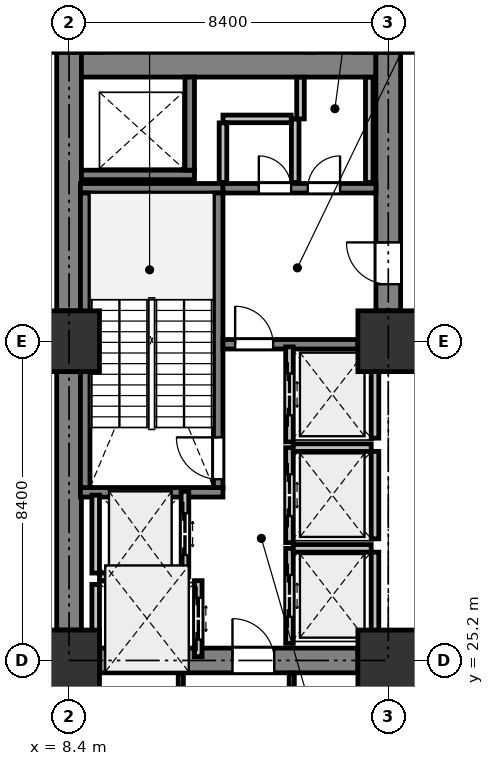
"""IFC4 building model, lengths in metres.
Left out: names, types, materials, properties, quantities, classifications, styles, units other than length and angle.
Written with IfcOpenShell. Run it as: python <this file> out.ifc"""

import sys

from ifc_helpers import new_model, si_unit, direction, frame, frame_2d, origin, origin_2d, place, context, subcontext, project, spatial, rectangle, extrude, element, fill, save


model = new_model("IFC4")
c1 = context("Model", 3, precision=1e-05, world=origin(), true_north=direction((0.0, 1.0)))
c2 = subcontext(c1, "Body", "Model", "MODEL_VIEW")
j1 = project(units=[si_unit("LENGTHUNIT", "METRE"), si_unit("PLANEANGLEUNIT", "RADIAN")], contexts=[c1])
p1 = place(None, origin())
s1 = spatial("IfcSite", under=j1, at=p1, CompositionType="ELEMENT")
p2 = place(p1, origin())
s2 = spatial("IfcBuilding", under=s1, at=p2, CompositionType="ELEMENT")
p3 = place(p2, frame((0.0, 0.0, 10.2)))
s3 = spatial("IfcBuildingStorey", under=s2, at=p3, CompositionType="ELEMENT", Elevation=10.2)
for number, where, z_axis, x_axis in (
    (1, (8.4, 25.2, 0.0), (0.0, 0.0, 1.0), (1.0, 0.0, 0.0)),
    (2, (8.4, 33.6, 0.0), (0.0, 0.0, 1.0), (1.0, 0.0, 0.0)),
    (3, (16.8, 25.2, 0.0), (0.0, 0.0, 1.0), (1.0, 0.0, 0.0)),
    (4, (16.8, 33.6, 0.0), (0.0, 0.0, 1.0), (1.0, 0.0, 0.0)),
):
    element("IfcColumn", number, at=place(p3, frame(where, z_axis=z_axis, x_axis=x_axis)), inside=s3, PredefinedType="COLUMN", context=c2, shape_type="SweptSolid", body=[
        extrude(rectangle(XDim=1.6, YDim=1.6, at=origin_2d()), origin(), (0.0, 0.0, 1.0), 4.8),
    ])
for number, where, z_axis, x_axis in (
    (5, (8.4, 26.0, 0.0), (0.0, 0.0, 1.0), (0.0, 1.0, 0.0)),
    (6, (8.4, 34.4, 0.0), (0.0, 0.0, 1.0), (0.0, 1.0, 0.0)),
):
    element("IfcWall", number, at=place(p3, frame(where, z_axis=z_axis, x_axis=x_axis)), inside=s3, PredefinedType="SHEAR", context=c2, shape_type="SweptSolid", body=[
        extrude(rectangle(XDim=6.8, YDim=0.65, at=frame_2d((3.4, 0.0))), origin(), (0.0, 0.0, 1.0), 4.525),
    ])
p4 = place(p3, frame((8.725, 40.875, 0.0), z_axis=(0.0, 0.0, 1.0), x_axis=(1.0, 0.0, 0.0)))
e7 = element("IfcWall", 7, at=p4, inside=s3, PredefinedType="SHEAR", context=c2, shape_type="SweptSolid", body=[
    extrude(rectangle(XDim=7.75, YDim=0.65, at=frame_2d((3.875, 0.0))), origin(), (0.0, 0.0, 1.0), 4.525),
])
p5 = place(p3, frame((16.8, 34.4, 0.0), z_axis=(0.0, 0.0, 1.0), x_axis=(0.0, 1.0, 0.0)))
e8 = element("IfcWall", 8, at=p5, inside=s3, PredefinedType="SHEAR", context=c2, shape_type="SweptSolid", body=[
    extrude(rectangle(XDim=6.8, YDim=0.65, at=frame_2d((3.4, 0.0))), origin(), (0.0, 0.0, 1.0), 4.525),
])
p6 = place(p5, frame((0.7, 0.0, 0.0)))
e9 = element("IfcOpeningElement", 9, at=p6, cuts=e8, PredefinedType="OPENING", context=c2, shape_type="SweptSolid", body=[
    extrude(rectangle(XDim=1.1, YDim=2.15, at=frame_2d((0.55, 1.075))), frame((0.0, 0.335, 0.0), z_axis=(0.0, -1.0, 0.0), x_axis=(1.0, 0.0, 0.0)), (0.0, 0.0, 1.0), 0.67),
])
p7 = place(p3, frame((9.2, 25.2, 0.0), z_axis=(0.0, 0.0, 1.0), x_axis=(1.0, 0.0, 0.0)))
e10 = element("IfcWall", 10, at=p7, inside=s3, PredefinedType="SHEAR", context=c2, shape_type="SweptSolid", body=[
    extrude(rectangle(XDim=6.8, YDim=0.65, at=frame_2d((3.4, 0.0))), origin(), (0.0, 0.0, 1.0), 4.525),
])
p8 = place(p7, frame((3.5, 0.0, 0.0)))
e11 = element("IfcOpeningElement", 11, at=p8, cuts=e10, PredefinedType="OPENING", context=c2, shape_type="SweptSolid", body=[
    extrude(rectangle(XDim=1.1, YDim=2.15, at=frame_2d((0.55, 1.075))), frame((0.0, 0.335, 0.0), z_axis=(0.0, -1.0, 0.0), x_axis=(1.0, 0.0, 0.0)), (0.0, 0.0, 1.0), 0.67),
])
for number, where, z_axis, x_axis in (
    (12, (12.45, 29.625, 0.0), (0.0, 0.0, 1.0), (-1.0, 0.0, 0.0)),
    (13, (12.45, 37.625, 0.0), (0.0, 0.0, 1.0), (-1.0, 0.0, 0.0)),
):
    element("IfcWall", number, at=place(p3, frame(where, z_axis=z_axis, x_axis=x_axis)), inside=s3, PredefinedType="SHEAR", context=c2, shape_type="SweptSolid", body=[
        extrude(rectangle(XDim=3.75, YDim=0.25, at=frame_2d((1.875, 0.0))), origin(), (0.0, 0.0, 1.0), 4.525),
    ])
p9 = place(p3, frame((12.325, 29.75, 0.0), z_axis=(0.0, 0.0, 1.0), x_axis=(0.0, 1.0, 0.0)))
e14 = element("IfcWall", 14, at=p9, inside=s3, PredefinedType="SHEAR", context=c2, shape_type="SweptSolid", body=[
    extrude(rectangle(XDim=7.75, YDim=0.25, at=frame_2d((3.875, 0.0))), origin(), (0.0, 0.0, 1.0), 4.525),
])
p10 = place(p9, frame((0.22, 0.0, 0.0)))
e15 = element("IfcOpeningElement", 15, at=p10, cuts=e14, PredefinedType="OPENING", context=c2, shape_type="SweptSolid", body=[
    extrude(rectangle(XDim=1.1, YDim=2.15, at=frame_2d((0.55, 1.075))), frame((0.0, 0.135, 0.0), z_axis=(0.0, -1.0, 0.0), x_axis=(1.0, 0.0, 0.0)), (0.0, 0.0, 1.0), 0.27),
])
p11 = place(p3, frame((8.825, 29.75, 0.0), z_axis=(0.0, 0.0, 1.0), x_axis=(0.0, 1.0, 0.0)))
e16 = element("IfcWall", 16, at=p11, inside=s3, PredefinedType="SHEAR", context=c2, shape_type="SweptSolid", body=[
    extrude(rectangle(XDim=7.75, YDim=0.25, at=frame_2d((3.875, 0.0))), origin(), (0.0, 0.0, 1.0), 4.525),
])
p12 = place(p3, frame((8.725, 37.975, 0.0), z_axis=(0.0, 0.0, 1.0), x_axis=(1.0, 0.0, 0.0)))
e17 = element("IfcWall", 17, at=p12, inside=s3, PredefinedType="SHEAR", context=c2, shape_type="SweptSolid", body=[
    extrude(rectangle(XDim=2.975, YDim=0.25, at=frame_2d((1.487, 0.0))), origin(), (0.0, 0.0, 1.0), 4.525),
])
p13 = place(p3, frame((11.575, 38.1, 0.0), z_axis=(0.0, 0.0, 1.0), x_axis=(0.0, 1.0, 0.0)))
e18 = element("IfcWall", 18, at=p13, inside=s3, PredefinedType="SHEAR", context=c2, shape_type="SweptSolid", body=[
    extrude(rectangle(XDim=2.45, YDim=0.25, at=frame_2d((1.225, 0.0))), origin(), (0.0, 0.0, 1.0), 4.525),
])
p14 = place(p3, frame((12.45, 33.52, 0.0), z_axis=(0.0, 0.0, 1.0), x_axis=(1.0, 0.0, 0.0)))
e19 = element("IfcWall", 19, at=p14, inside=s3, PredefinedType="SHEAR", context=c2, shape_type="SweptSolid", body=[
    extrude(rectangle(XDim=3.55, YDim=0.25, at=frame_2d((1.775, 0.0))), origin(), (0.0, 0.0, 1.0), 4.525),
])
p15 = place(p14, frame((0.32, 0.0, 0.0)))
e20 = element("IfcOpeningElement", 20, at=p15, cuts=e19, PredefinedType="OPENING", context=c2, shape_type="SweptSolid", body=[
    extrude(rectangle(XDim=1.0, YDim=2.15, at=frame_2d((0.5, 1.075))), frame((0.0, 0.135, 0.0), z_axis=(0.0, -1.0, 0.0), x_axis=(1.0, 0.0, 0.0)), (0.0, 0.0, 1.0), 0.27),
])
p16 = place(p3, frame((12.45, 37.625, 0.0), z_axis=(0.0, 0.0, 1.0), x_axis=(1.0, 0.0, 0.0)))
e21 = element("IfcWall", 21, at=p16, inside=s3, PredefinedType="SHEAR", context=c2, shape_type="SweptSolid", body=[
    extrude(rectangle(XDim=4.025, YDim=0.25, at=frame_2d((2.013, 0.0))), origin(), (0.0, 0.0, 1.0), 4.525),
])
p17 = place(p16, frame((0.944, 0.0, 0.0)))
e22 = element("IfcOpeningElement", 22, at=p17, cuts=e21, PredefinedType="OPENING", context=c2, shape_type="SweptSolid", body=[
    extrude(rectangle(XDim=0.85, YDim=2.15, at=frame_2d((0.425, 1.075))), frame((0.0, 0.135, 0.0), z_axis=(0.0, -1.0, 0.0), x_axis=(1.0, 0.0, 0.0)), (0.0, 0.0, 1.0), 0.27),
])
p18 = place(p16, frame((2.231, 0.0, 0.0)))
e23 = element("IfcOpeningElement", 23, at=p18, cuts=e21, PredefinedType="OPENING", context=c2, shape_type="SweptSolid", body=[
    extrude(rectangle(XDim=0.85, YDim=2.15, at=frame_2d((0.425, 1.075))), frame((0.0, 0.135, 0.0), z_axis=(0.0, -1.0, 0.0), x_axis=(1.0, 0.0, 0.0)), (0.0, 0.0, 1.0), 0.27),
])
p19 = place(p3, frame((11.45, 27.4, 0.0), z_axis=(0.0, 0.0, 1.0), x_axis=(0.0, 1.0, 0.0)))
e24 = element("IfcWall", 24, at=p19, inside=s3, PredefinedType="PARTITIONING", context=c2, shape_type="SweptSolid", body=[
    extrude(rectangle(XDim=2.25, YDim=0.2, at=frame_2d((1.125, 0.0))), origin(), (0.0, 0.0, 1.0), 4.525),
])
p20 = place(p19, frame((0.575, 0.0, 0.0)))
e25 = element("IfcOpeningElement", 25, at=p20, cuts=e24, PredefinedType="OPENING", context=c2, shape_type="SweptSolid", body=[
    extrude(rectangle(XDim=1.1, YDim=2.2, at=frame_2d((0.55, 1.1))), frame((0.0, 0.11, 0.0), z_axis=(0.0, -1.0, 0.0), x_axis=(1.0, 0.0, 0.0)), (0.0, 0.0, 1.0), 0.22),
])
p21 = place(p3, frame((9.1, 27.5, 0.0), z_axis=(0.0, 0.0, 1.0), x_axis=(0.0, 1.0, 0.0)))
e26 = element("IfcWall", 26, at=p21, inside=s3, PredefinedType="PARTITIONING", context=c2, shape_type="SweptSolid", body=[
    extrude(rectangle(XDim=2.05, YDim=0.2, at=frame_2d((1.025, 0.0))), origin(), (0.0, 0.0, 1.0), 4.525),
])
p22 = place(p3, frame((9.2, 27.4, 0.0), z_axis=(0.0, 0.0, 1.0), x_axis=(1.0, 0.0, 0.0)))
e27 = element("IfcWall", 27, at=p22, inside=s3, PredefinedType="PARTITIONING", context=c2, shape_type="SweptSolid", body=[
    extrude(rectangle(XDim=2.15, YDim=0.2, at=frame_2d((1.075, 0.0))), origin(), (0.0, 0.0, 1.0), 4.525),
])
p23 = place(p3, frame((11.8, 25.3, 0.0), z_axis=(0.0, 0.0, 1.0), x_axis=(0.0, 1.0, 0.0)))
e28 = element("IfcWall", 28, at=p23, inside=s3, PredefinedType="PARTITIONING", context=c2, shape_type="SweptSolid", body=[
    extrude(rectangle(XDim=2.0, YDim=0.2, at=frame_2d((1.0, 0.0))), origin(), (0.0, 0.0, 1.0), 4.525),
])
p24 = place(p23, frame((0.45, 0.0, 0.0)))
e29 = element("IfcOpeningElement", 29, at=p24, cuts=e28, PredefinedType="OPENING", context=c2, shape_type="SweptSolid", body=[
    extrude(rectangle(XDim=1.1, YDim=2.2, at=frame_2d((0.55, 1.1))), frame((0.0, 0.11, 0.0), z_axis=(0.0, -1.0, 0.0), x_axis=(1.0, 0.0, 0.0)), (0.0, 0.0, 1.0), 0.22),
])
p25 = place(p3, frame((9.1, 25.4, 0.0), z_axis=(0.0, 0.0, 1.0), x_axis=(0.0, 1.0, 0.0)))
e30 = element("IfcWall", 30, at=p25, inside=s3, PredefinedType="PARTITIONING", context=c2, shape_type="SweptSolid", body=[
    extrude(rectangle(XDim=1.8, YDim=0.2, at=frame_2d((0.9, 0.0))), origin(), (0.0, 0.0, 1.0), 4.525),
])
p26 = place(p3, frame((14.2, 25.65, 0.0), z_axis=(0.0, 0.0, 1.0), x_axis=(0.0, 1.0, 0.0)))
e31 = element("IfcWall", 31, at=p26, inside=s3, PredefinedType="PARTITIONING", context=c2, shape_type="SweptSolid", body=[
    extrude(rectangle(XDim=2.5, YDim=0.2, at=frame_2d((1.25, 0.0))), origin(), (0.0, 0.0, 1.0), 4.525),
])
p27 = place(p26, frame((0.7, 0.0, 0.0)))
e32 = element("IfcOpeningElement", 32, at=p27, cuts=e31, PredefinedType="OPENING", context=c2, shape_type="SweptSolid", body=[
    extrude(rectangle(XDim=1.1, YDim=2.2, at=frame_2d((0.55, 1.1))), frame((0.0, 0.11, 0.0), z_axis=(0.0, -1.0, 0.0), x_axis=(1.0, 0.0, 0.0)), (0.0, 0.0, 1.0), 0.22),
])
p28 = place(p3, frame((16.45, 25.75, 0.0), z_axis=(0.0, 0.0, 1.0), x_axis=(0.0, 1.0, 0.0)))
e33 = element("IfcWall", 33, at=p28, inside=s3, PredefinedType="PARTITIONING", context=c2, shape_type="SweptSolid", body=[
    extrude(rectangle(XDim=2.3, YDim=0.2, at=frame_2d((1.15, 0.0))), origin(), (0.0, 0.0, 1.0), 4.525),
])
p29 = place(p3, frame((14.3, 28.15, 0.0), z_axis=(0.0, 0.0, 1.0), x_axis=(1.0, 0.0, 0.0)))
e34 = element("IfcWall", 34, at=p29, inside=s3, PredefinedType="PARTITIONING", context=c2, shape_type="SweptSolid", body=[
    extrude(rectangle(XDim=2.05, YDim=0.2, at=frame_2d((1.025, 0.0))), origin(), (0.0, 0.0, 1.0), 4.525),
])
p30 = place(p3, frame((14.2, 28.3, 0.0), z_axis=(0.0, 0.0, 1.0), x_axis=(0.0, 1.0, 0.0)))
e35 = element("IfcWall", 35, at=p30, inside=s3, PredefinedType="PARTITIONING", context=c2, shape_type="SweptSolid", body=[
    extrude(rectangle(XDim=2.5, YDim=0.2, at=frame_2d((1.25, 0.0))), origin(), (0.0, 0.0, 1.0), 4.525),
])
p31 = place(p30, frame((0.7, 0.0, 0.0)))
e36 = element("IfcOpeningElement", 36, at=p31, cuts=e35, PredefinedType="OPENING", context=c2, shape_type="SweptSolid", body=[
    extrude(rectangle(XDim=1.1, YDim=2.2, at=frame_2d((0.55, 1.1))), frame((0.0, 0.11, 0.0), z_axis=(0.0, -1.0, 0.0), x_axis=(1.0, 0.0, 0.0)), (0.0, 0.0, 1.0), 0.22),
])
p32 = place(p3, frame((16.45, 28.4, 0.0), z_axis=(0.0, 0.0, 1.0), x_axis=(0.0, 1.0, 0.0)))
e37 = element("IfcWall", 37, at=p32, inside=s3, PredefinedType="PARTITIONING", context=c2, shape_type="SweptSolid", body=[
    extrude(rectangle(XDim=2.3, YDim=0.2, at=frame_2d((1.15, 0.0))), origin(), (0.0, 0.0, 1.0), 4.525),
])
p33 = place(p3, frame((14.3, 30.8, 0.0), z_axis=(0.0, 0.0, 1.0), x_axis=(1.0, 0.0, 0.0)))
e38 = element("IfcWall", 38, at=p33, inside=s3, PredefinedType="PARTITIONING", context=c2, shape_type="SweptSolid", body=[
    extrude(rectangle(XDim=2.05, YDim=0.2, at=frame_2d((1.025, 0.0))), origin(), (0.0, 0.0, 1.0), 4.525),
])
p34 = place(p3, frame((14.2, 30.95, 0.0), z_axis=(0.0, 0.0, 1.0), x_axis=(0.0, 1.0, 0.0)))
e39 = element("IfcWall", 39, at=p34, inside=s3, PredefinedType="PARTITIONING", context=c2, shape_type="SweptSolid", body=[
    extrude(rectangle(XDim=2.5, YDim=0.2, at=frame_2d((1.25, 0.0))), origin(), (0.0, 0.0, 1.0), 4.525),
])
p35 = place(p34, frame((0.7, 0.0, 0.0)))
e40 = element("IfcOpeningElement", 40, at=p35, cuts=e39, PredefinedType="OPENING", context=c2, shape_type="SweptSolid", body=[
    extrude(rectangle(XDim=1.1, YDim=2.2, at=frame_2d((0.55, 1.1))), frame((0.0, 0.11, 0.0), z_axis=(0.0, -1.0, 0.0), x_axis=(1.0, 0.0, 0.0)), (0.0, 0.0, 1.0), 0.22),
])
p36 = place(p3, frame((16.45, 31.05, 0.0), z_axis=(0.0, 0.0, 1.0), x_axis=(0.0, 1.0, 0.0)))
e41 = element("IfcWall", 41, at=p36, inside=s3, PredefinedType="PARTITIONING", context=c2, shape_type="SweptSolid", body=[
    extrude(rectangle(XDim=2.3, YDim=0.2, at=frame_2d((1.15, 0.0))), origin(), (0.0, 0.0, 1.0), 4.525),
])
p37 = place(p3, frame((14.35, 37.78, 0.0), z_axis=(0.0, 0.0, 1.0), x_axis=(0.0, 1.0, 0.0)))
e42 = element("IfcWall", 42, at=p37, inside=s3, PredefinedType="PARTITIONING", context=c2, shape_type="SweptSolid", body=[
    extrude(rectangle(XDim=1.67, YDim=0.2, at=frame_2d((0.835, 0.0))), origin(), (0.0, 0.0, 1.0), 3.425),
])
p38 = place(p3, frame((14.246, 39.45, 0.0), z_axis=(0.0, 0.0, 1.0), x_axis=(-1.0, 0.0, 0.0)))
e43 = element("IfcWall", 43, at=p38, inside=s3, PredefinedType="PARTITIONING", context=c2, shape_type="SweptSolid", body=[
    extrude(rectangle(XDim=1.796, YDim=0.2, at=frame_2d((0.898, 0.0))), origin(), (0.0, 0.0, 1.0), 3.425),
])
p39 = place(p3, frame((12.45, 39.346, 0.0), z_axis=(0.0, 0.0, 1.0), x_axis=(0.0, -1.0, 0.0)))
e44 = element("IfcWall", 44, at=p39, inside=s3, PredefinedType="PARTITIONING", context=c2, shape_type="SweptSolid", body=[
    extrude(rectangle(XDim=1.566, YDim=0.2, at=frame_2d((0.783, 0.0))), origin(), (0.0, 0.0, 1.0), 3.425),
])
p40 = place(p3, frame((16.3, 37.78, 0.0), z_axis=(0.0, 0.0, 1.0), x_axis=(0.0, 1.0, 0.0)))
e45 = element("IfcWall", 45, at=p40, inside=s3, PredefinedType="PARTITIONING", context=c2, shape_type="SweptSolid", body=[
    extrude(rectangle(XDim=2.766, YDim=0.2, at=frame_2d((1.383, 0.0))), origin(), (0.0, 0.0, 1.0), 3.425),
])
p41 = place(p3, frame((14.49, 40.546, 0.0), z_axis=(0.0, 0.0, 1.0), x_axis=(0.0, -1.0, 0.0)))
e46 = element("IfcWall", 46, at=p41, inside=s3, PredefinedType="PARTITIONING", context=c2, shape_type="SweptSolid", body=[
    extrude(rectangle(XDim=1.096, YDim=0.2, at=frame_2d((0.548, 0.0))), origin(), (0.0, 0.0, 1.0), 3.425),
])
p42 = place(p3, frame((14.26, 24.871, 0.0), z_axis=(0.0, 0.0, 1.0), x_axis=(0.0, -1.0, 0.0)))
e47 = element("IfcWall", 47, at=p42, inside=s3, PredefinedType="PARTITIONING", context=c2, shape_type="SweptSolid", body=[
    extrude(rectangle(XDim=4.711, YDim=0.135, at=frame_2d((2.355, 0.0))), origin(), (0.0, 0.0, 1.0), 4.525),
])
p43 = place(p42, frame((1.881, 0.0, 0.0)))
e48 = element("IfcOpeningElement", 48, at=p43, cuts=e47, PredefinedType="OPENING", context=c2, shape_type="SweptSolid", body=[
    extrude(rectangle(XDim=0.95, YDim=2.15, at=frame_2d((0.475, 1.075))), frame((0.0, 0.077, 0.0), z_axis=(0.0, -1.0, 0.0), x_axis=(1.0, 0.0, 0.0)), (0.0, 0.0, 1.0), 0.155),
])
p44 = place(p3, frame((11.34, 20.231, 0.0), z_axis=(0.0, 0.0, 1.0), x_axis=(0.0, 1.0, 0.0)))
e49 = element("IfcWall", 49, at=p44, inside=s3, PredefinedType="PARTITIONING", context=c2, shape_type="SweptSolid", body=[
    extrude(rectangle(XDim=4.64, YDim=0.135, at=frame_2d((2.32, 0.0))), origin(), (0.0, 0.0, 1.0), 4.525),
])
p45 = place(p44, frame((1.845, 0.0, 0.0)))
e50 = element("IfcOpeningElement", 50, at=p45, cuts=e49, PredefinedType="OPENING", context=c2, shape_type="SweptSolid", body=[
    extrude(rectangle(XDim=0.95, YDim=2.15, at=frame_2d((0.475, 1.075))), frame((0.0, 0.077, 0.0), z_axis=(0.0, -1.0, 0.0), x_axis=(1.0, 0.0, 0.0)), (0.0, 0.0, 1.0), 0.155),
])
p46 = place(p6, origin())
e51 = element("IfcDoor", 51, at=p46, inside=s3, OperationType="SINGLE_SWING_RIGHT", PredefinedType="DOOR", context=c2, shape_type="SweptSolid", body=[
    extrude(rectangle(XDim=1.1, YDim=2.15, at=frame_2d((0.55, 1.075))), frame((0.0, 0.025, 0.0), z_axis=(0.0, -1.0, 0.0), x_axis=(1.0, 0.0, 0.0)), (0.0, 0.0, 1.0), 0.05),
])
fill(e9, e51)
p47 = place(p8, origin())
e52 = element("IfcDoor", 52, at=p47, inside=s3, OperationType="SINGLE_SWING_LEFT", PredefinedType="DOOR", context=c2, shape_type="SweptSolid", body=[
    extrude(rectangle(XDim=1.1, YDim=2.15, at=frame_2d((0.55, 1.075))), frame((0.0, 0.025, 0.0), z_axis=(0.0, -1.0, 0.0), x_axis=(1.0, 0.0, 0.0)), (0.0, 0.0, 1.0), 0.05),
])
fill(e11, e52)
p48 = place(p10, origin())
e53 = element("IfcDoor", 53, at=p48, inside=s3, OperationType="SINGLE_SWING_RIGHT", PredefinedType="DOOR", context=c2, shape_type="SweptSolid", body=[
    extrude(rectangle(XDim=1.1, YDim=2.15, at=frame_2d((0.55, 1.075))), frame((0.0, 0.025, 0.0), z_axis=(0.0, -1.0, 0.0), x_axis=(1.0, 0.0, 0.0)), (0.0, 0.0, 1.0), 0.05),
])
fill(e15, e53)
p49 = place(p15, origin())
e54 = element("IfcDoor", 54, at=p49, inside=s3, OperationType="SINGLE_SWING_LEFT", PredefinedType="DOOR", context=c2, shape_type="SweptSolid", body=[
    extrude(rectangle(XDim=1.0, YDim=2.15, at=frame_2d((0.5, 1.075))), frame((0.0, 0.025, 0.0), z_axis=(0.0, -1.0, 0.0), x_axis=(1.0, 0.0, 0.0)), (0.0, 0.0, 1.0), 0.05),
])
fill(e20, e54)
p50 = place(p20, origin())
e55 = element("IfcDoor", 55, at=p50, inside=s3, OperationType="DOUBLE_DOOR_SLIDING", PredefinedType="DOOR", context=c2, shape_type="SweptSolid", body=[
    extrude(rectangle(XDim=1.1, YDim=2.2, at=frame_2d((0.55, 1.1))), frame((0.0, 0.025, 0.0), z_axis=(0.0, -1.0, 0.0), x_axis=(1.0, 0.0, 0.0)), (0.0, 0.0, 1.0), 0.05),
])
fill(e25, e55)
p51 = place(p24, origin())
e56 = element("IfcDoor", 56, at=p51, inside=s3, OperationType="DOUBLE_DOOR_SLIDING", PredefinedType="DOOR", context=c2, shape_type="SweptSolid", body=[
    extrude(rectangle(XDim=1.1, YDim=2.2, at=frame_2d((0.55, 1.1))), frame((0.0, 0.025, 0.0), z_axis=(0.0, -1.0, 0.0), x_axis=(1.0, 0.0, 0.0)), (0.0, 0.0, 1.0), 0.05),
])
fill(e29, e56)
p52 = place(p27, origin())
e57 = element("IfcDoor", 57, at=p52, inside=s3, OperationType="DOUBLE_DOOR_SLIDING", PredefinedType="DOOR", context=c2, shape_type="SweptSolid", body=[
    extrude(rectangle(XDim=1.1, YDim=2.2, at=frame_2d((0.55, 1.1))), frame((0.0, 0.025, 0.0), z_axis=(0.0, -1.0, 0.0), x_axis=(1.0, 0.0, 0.0)), (0.0, 0.0, 1.0), 0.05),
])
fill(e32, e57)
p53 = place(p31, origin())
e58 = element("IfcDoor", 58, at=p53, inside=s3, OperationType="DOUBLE_DOOR_SLIDING", PredefinedType="DOOR", context=c2, shape_type="SweptSolid", body=[
    extrude(rectangle(XDim=1.1, YDim=2.2, at=frame_2d((0.55, 1.1))), frame((0.0, 0.025, 0.0), z_axis=(0.0, -1.0, 0.0), x_axis=(1.0, 0.0, 0.0)), (0.0, 0.0, 1.0), 0.05),
])
fill(e36, e58)
p54 = place(p35, origin())
e59 = element("IfcDoor", 59, at=p54, inside=s3, OperationType="DOUBLE_DOOR_SLIDING", PredefinedType="DOOR", context=c2, shape_type="SweptSolid", body=[
    extrude(rectangle(XDim=1.1, YDim=2.2, at=frame_2d((0.55, 1.1))), frame((0.0, 0.025, 0.0), z_axis=(0.0, -1.0, 0.0), x_axis=(1.0, 0.0, 0.0)), (0.0, 0.0, 1.0), 0.05),
])
fill(e40, e59)
p55 = place(p17, origin())
e60 = element("IfcDoor", 60, at=p55, inside=s3, OperationType="SINGLE_SWING_LEFT", PredefinedType="DOOR", context=c2, shape_type="SweptSolid", body=[
    extrude(rectangle(XDim=0.85, YDim=2.15, at=frame_2d((0.425, 1.075))), frame((0.0, 0.025, 0.0), z_axis=(0.0, -1.0, 0.0), x_axis=(1.0, 0.0, 0.0)), (0.0, 0.0, 1.0), 0.05),
])
fill(e22, e60)
p56 = place(p18, origin())
e61 = element("IfcDoor", 61, at=p56, inside=s3, OperationType="SINGLE_SWING_RIGHT", PredefinedType="DOOR", context=c2, shape_type="SweptSolid", body=[
    extrude(rectangle(XDim=0.85, YDim=2.15, at=frame_2d((0.425, 1.075))), frame((0.0, 0.025, 0.0), z_axis=(0.0, -1.0, 0.0), x_axis=(1.0, 0.0, 0.0)), (0.0, 0.0, 1.0), 0.05),
])
fill(e23, e61)
save(model, sys.argv[1])
